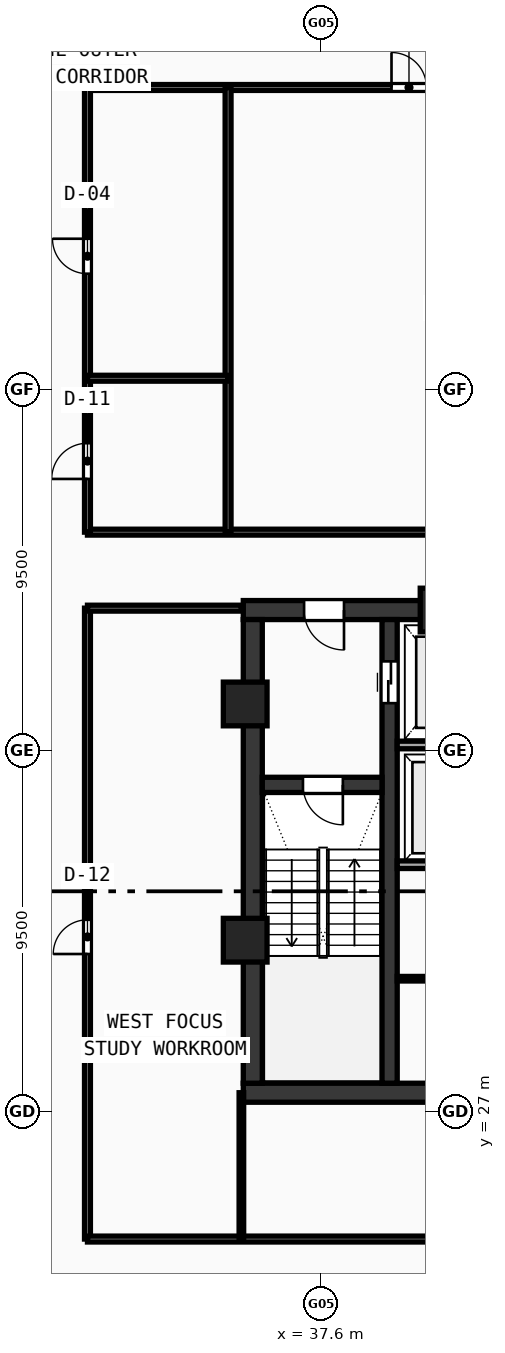
"""IFC4 building model, lengths in metres.
Left out: names, types, materials, properties, quantities, classifications, styles, units other than length and angle.
Written with IfcOpenShell. Run it as: python <this file> out.ifc"""

import sys

from ifc_helpers import new_model, si_unit, direction, frame, frame_2d, origin, origin_with_axes, origin_2d, place, context, subcontext, project, spatial, rectangle, hollow_rectangle, extrude, source, transform, mapped, element, fill, save


model = new_model("IFC4")
c1 = context("Model", 3, precision=1e-05, world=origin(), true_north=direction((0.0, 1.0)))
c2 = subcontext(c1, "Body", "Model", "MODEL_VIEW")
j1 = project(units=[si_unit("LENGTHUNIT", "METRE"), si_unit("PLANEANGLEUNIT", "RADIAN")], contexts=[c1])
p1 = place(None, origin())
s1 = spatial("IfcSite", under=j1, at=p1, CompositionType="ELEMENT")
p2 = place(p1, origin())
s2 = spatial("IfcBuilding", under=s1, at=p2, CompositionType="ELEMENT")
p3 = place(p2, frame((0.0, 0.0, 188.56)))
s3 = spatial("IfcBuildingStorey", under=s2, at=p3, CompositionType="ELEMENT", Elevation=188.56)
p4 = place(p3, frame((35.55, 27.5, 0.0), z_axis=(0.0, 0.0, 1.0), x_axis=(1.0, 0.0, 0.0)))
e1 = element("IfcWall", 1, at=p4, inside=s3, PredefinedType="SHEAR", context=c2, shape_type="SweptSolid", body=[
    extrude(rectangle(XDim=24.9, YDim=0.5, at=frame_2d((12.45, 0.0))), origin(), (0.0, 0.0, 1.0), 3.54),
])
p5 = place(p3, frame((35.55, 40.2, 0.0), z_axis=(0.0, 0.0, 1.0), x_axis=(1.0, 0.0, 0.0)))
e2 = element("IfcWall", 2, at=p5, inside=s3, PredefinedType="SHEAR", context=c2, shape_type="SweptSolid", body=[
    extrude(rectangle(XDim=11.25, YDim=0.5, at=frame_2d((5.625, 0.0))), origin(), (0.0, 0.0, 1.0), 3.54),
])
p6 = place(p5, frame((1.6, 0.0, 0.0)))
e3 = element("IfcOpeningElement", 3, at=p6, cuts=e2, PredefinedType="OPENING", context=c2, shape_type="SweptSolid", body=[
    extrude(rectangle(XDim=1.05, YDim=2.1, at=frame_2d((0.525, 1.05))), frame((0.0, 0.26, 0.0), z_axis=(0.0, -1.0, 0.0), x_axis=(1.0, 0.0, 0.0)), (0.0, 0.0, 1.0), 0.52),
])
p7 = place(p3, frame((35.8, 27.75, 0.0), z_axis=(0.0, 0.0, 1.0), x_axis=(0.0, 1.0, 0.0)))
e4 = element("IfcWall", 4, at=p7, inside=s3, PredefinedType="SHEAR", context=c2, shape_type="SweptSolid", body=[
    extrude(rectangle(XDim=12.2, YDim=0.5, at=frame_2d((6.1, 0.0))), origin(), (0.0, 0.0, 1.0), 3.54),
])
p8 = place(p3, frame((39.4, 27.75, 0.0), z_axis=(0.0, 0.0, 1.0), x_axis=(0.0, 1.0, 0.0)))
e5 = element("IfcWall", 5, at=p8, inside=s3, PredefinedType="SHEAR", context=c2, shape_type="SweptSolid", body=[
    extrude(rectangle(XDim=12.2, YDim=0.4, at=frame_2d((6.1, 0.0))), origin(), (0.0, 0.0, 1.0), 3.54),
])
p9 = place(p8, frame((10.0, 0.0, 0.0)))
e6 = element("IfcOpeningElement", 6, at=p9, cuts=e5, PredefinedType="OPENING", context=c2, shape_type="SweptSolid", body=[
    extrude(rectangle(XDim=1.1, YDim=2.1, at=frame_2d((0.55, 1.05))), frame((0.0, 0.21, 0.0), z_axis=(0.0, -1.0, 0.0), x_axis=(1.0, 0.0, 0.0)), (0.0, 0.0, 1.0), 0.42),
])
p10 = place(p3, frame((36.05, 35.6, 0.0), z_axis=(0.0, 0.0, 1.0), x_axis=(1.0, 0.0, 0.0)))
e7 = element("IfcWall", 7, at=p10, inside=s3, PredefinedType="SHEAR", context=c2, shape_type="SweptSolid", body=[
    extrude(rectangle(XDim=3.15, YDim=0.4, at=frame_2d((1.575, 0.0))), origin(), (0.0, 0.0, 1.0), 3.54),
])
p11 = place(p10, frame((1.07, 0.0, 0.0)))
e8 = element("IfcOpeningElement", 8, at=p11, cuts=e7, PredefinedType="OPENING", context=c2, shape_type="SweptSolid", body=[
    extrude(rectangle(XDim=1.05, YDim=2.1, at=frame_2d((0.525, 1.05))), frame((0.0, 0.21, 0.0), z_axis=(0.0, -1.0, 0.0), x_axis=(1.0, 0.0, 0.0)), (0.0, 0.0, 1.0), 0.42),
])
m1 = source(origin(), c2, "Body", "SweptSolid", [
    extrude(hollow_rectangle(XDim=1.15, YDim=1.15, WallThickness=0.048, at=origin_2d()), origin(), (0.0, 0.0, 1.0), 3.8),
])
for number, where, z_axis, x_axis in (
    (9, (40.781, 40.2, -0.26), (0.0, 0.0, 1.0), (1.0, 0.0, 0.0)),
    (10, (35.6, 37.729, -0.26), (0.0, 0.0, 1.0), (1.0, 0.0, 0.0)),
    (11, (35.6, 31.513, -0.26), (0.0, 0.0, 1.0), (1.0, 0.0, 0.0)),
):
    element("IfcColumn", number, at=place(p3, frame(where, z_axis=z_axis, x_axis=x_axis)), inside=s3, PredefinedType="COLUMN", context=c2, shape_type="MappedRepresentation", body=[
        mapped(m1, transform((0.0, 0.0, 0.0), scale=1.0)),
    ])
for number, where, z_axis, x_axis in (
    (12, (39.6, 36.65, 0.0), (0.0, 0.0, 1.0), (1.0, 0.0, 0.0)),
    (13, (39.6, 33.5, 0.0), (0.0, 0.0, 1.0), (1.0, 0.0, 0.0)),
):
    element("IfcWall", number, at=place(p3, frame(where, z_axis=z_axis, x_axis=x_axis)), inside=s3, PredefinedType="SOLIDWALL", context=c2, shape_type="SweptSolid", body=[
        extrude(rectangle(XDim=2.72, YDim=0.2, at=frame_2d((1.36, 0.0))), origin(), (0.0, 0.0, 1.0), 3.54),
    ])
p12 = place(p3, frame((39.6, 30.5, 0.0), z_axis=(0.0, 0.0, 1.0), x_axis=(1.0, 0.0, 0.0)))
e14 = element("IfcWall", 14, at=p12, inside=s3, PredefinedType="PARTITIONING", context=c2, shape_type="SweptSolid", body=[
    extrude(rectangle(XDim=2.72, YDim=0.12, at=frame_2d((1.36, 0.0))), origin(), (0.0, 0.0, 1.0), 3.54),
])
p13 = place(p3, frame((31.45, 42.25, 0.0), z_axis=(0.0, 0.0, 1.0), x_axis=(1.0, 0.0, 0.0)))
e15 = element("IfcWall", 15, at=p13, inside=s3, PredefinedType="PARTITIONING", context=c2, shape_type="SweptSolid", body=[
    extrude(rectangle(XDim=33.1, YDim=0.155, at=frame_2d((16.55, 0.0))), origin(), (0.0, 0.0, 1.0), 2.89),
])
p14 = place(p3, frame((31.45, 53.95, 0.0), z_axis=(0.0, 0.0, 1.0), x_axis=(1.0, 0.0, 0.0)))
e16 = element("IfcWall", 16, at=p14, inside=s3, PredefinedType="PARTITIONING", context=c2, shape_type="SweptSolid", body=[
    extrude(rectangle(XDim=33.1, YDim=0.155, at=frame_2d((16.55, 0.0))), origin(), (0.0, 0.0, 1.0), 2.89),
])
p15 = place(p14, frame((8.0, 0.0, 0.0)))
e17 = element("IfcOpeningElement", 17, at=p15, cuts=e16, PredefinedType="OPENING", context=c2, shape_type="SweptSolid", body=[
    extrude(rectangle(XDim=0.92, YDim=2.1, at=frame_2d((0.46, 1.05))), frame((0.0, 0.087, 0.0), z_axis=(0.0, -1.0, 0.0), x_axis=(1.0, 0.0, 0.0)), (0.0, 0.0, 1.0), 0.175),
])
p16 = place(p14, frame((21.55, 0.0, 0.0)))
e18 = element("IfcOpeningElement", 18, at=p16, cuts=e16, PredefinedType="OPENING", context=c2, shape_type="SweptSolid", body=[
    extrude(rectangle(XDim=0.92, YDim=2.1, at=frame_2d((0.46, 1.05))), frame((0.0, 0.087, 0.0), z_axis=(0.0, -1.0, 0.0), x_axis=(1.0, 0.0, 0.0)), (0.0, 0.0, 1.0), 0.175),
])
p17 = place(p3, frame((31.45, 42.25, 0.0), z_axis=(0.0, 0.0, 1.0), x_axis=(0.0, 1.0, 0.0)))
e19 = element("IfcWall", 19, at=p17, inside=s3, PredefinedType="PARTITIONING", context=c2, shape_type="SweptSolid", body=[
    extrude(rectangle(XDim=11.7, YDim=0.155, at=frame_2d((5.85, 0.0))), origin(), (0.0, 0.0, 1.0), 2.89),
])
p18 = place(p17, frame((1.4, 0.0, 0.0)))
e20 = element("IfcOpeningElement", 20, at=p18, cuts=e19, PredefinedType="OPENING", context=c2, shape_type="SweptSolid", body=[
    extrude(rectangle(XDim=0.94, YDim=2.1, at=frame_2d((0.47, 1.05))), frame((0.0, 0.087, 0.0), z_axis=(0.0, -1.0, 0.0), x_axis=(1.0, 0.0, 0.0)), (0.0, 0.0, 1.0), 0.175),
])
p19 = place(p17, frame((6.8, 0.0, 0.0)))
e21 = element("IfcOpeningElement", 21, at=p19, cuts=e19, PredefinedType="OPENING", context=c2, shape_type="SweptSolid", body=[
    extrude(rectangle(XDim=0.92, YDim=2.1, at=frame_2d((0.46, 1.05))), frame((0.0, 0.087, 0.0), z_axis=(0.0, -1.0, 0.0), x_axis=(1.0, 0.0, 0.0)), (0.0, 0.0, 1.0), 0.175),
])
p20 = place(p3, frame((35.15, 42.25, 0.0), z_axis=(0.0, 0.0, 1.0), x_axis=(0.0, 1.0, 0.0)))
e22 = element("IfcWall", 22, at=p20, inside=s3, PredefinedType="PARTITIONING", context=c2, shape_type="SweptSolid", body=[
    extrude(rectangle(XDim=11.7, YDim=0.155, at=frame_2d((5.85, 0.0))), origin(), (0.0, 0.0, 1.0), 2.89),
])
p21 = place(p3, frame((31.45, 46.3, 0.0), z_axis=(0.0, 0.0, 1.0), x_axis=(1.0, 0.0, 0.0)))
e23 = element("IfcWall", 23, at=p21, inside=s3, PredefinedType="PARTITIONING", context=c2, shape_type="SweptSolid", body=[
    extrude(rectangle(XDim=3.7, YDim=0.155, at=frame_2d((1.85, 0.0))), origin(), (0.0, 0.0, 1.0), 2.89),
])
p22 = place(p3, frame((31.45, 23.65, 0.0), z_axis=(0.0, 0.0, 1.0), x_axis=(0.0, 1.0, 0.0)))
e24 = element("IfcWall", 24, at=p22, inside=s3, PredefinedType="PARTITIONING", context=c2, shape_type="SweptSolid", body=[
    extrude(rectangle(XDim=16.6, YDim=0.155, at=frame_2d((8.3, 0.0))), origin(), (0.0, 0.0, 1.0), 2.89),
])
p23 = place(p22, frame((7.5, 0.0, 0.0)))
e25 = element("IfcOpeningElement", 25, at=p23, cuts=e24, PredefinedType="OPENING", context=c2, shape_type="SweptSolid", body=[
    extrude(rectangle(XDim=0.9, YDim=2.08, at=frame_2d((0.45, 1.04))), frame((0.0, 0.087, 0.0), z_axis=(0.0, -1.0, 0.0), x_axis=(1.0, 0.0, 0.0)), (0.0, 0.0, 1.0), 0.175),
])
p24 = place(p3, frame((31.45, 23.65, 0.0), z_axis=(0.0, 0.0, 1.0), x_axis=(1.0, 0.0, 0.0)))
e26 = element("IfcWall", 26, at=p24, inside=s3, PredefinedType="PARTITIONING", context=c2, shape_type="SweptSolid", body=[
    extrude(rectangle(XDim=33.1, YDim=0.155, at=frame_2d((16.55, 0.0))), origin(), (0.0, 0.0, 1.0), 2.89),
])
p25 = place(p24, frame((16.0, 0.0, 0.0)))
e27 = element("IfcOpeningElement", 27, at=p25, cuts=e26, PredefinedType="OPENING", context=c2, shape_type="SweptSolid", body=[
    extrude(rectangle(XDim=0.92, YDim=2.1, at=frame_2d((0.46, 1.05))), frame((0.0, 0.087, 0.0), z_axis=(0.0, -1.0, 0.0), x_axis=(1.0, 0.0, 0.0)), (0.0, 0.0, 1.0), 0.175),
])
p26 = place(p3, frame((31.45, 40.25, 0.0), z_axis=(0.0, 0.0, 1.0), x_axis=(1.0, 0.0, 0.0)))
e28 = element("IfcWall", 28, at=p26, inside=s3, PredefinedType="PARTITIONING", context=c2, shape_type="SweptSolid", body=[
    extrude(rectangle(XDim=4.05, YDim=0.155, at=frame_2d((2.025, 0.0))), origin(), (0.0, 0.0, 1.0), 3.54),
])
p27 = place(p3, frame((35.5, 23.65, 0.0), z_axis=(0.0, 0.0, 1.0), x_axis=(0.0, 1.0, 0.0)))
e29 = element("IfcWall", 29, at=p27, inside=s3, PredefinedType="PARTITIONING", context=c2, shape_type="SweptSolid", body=[
    extrude(rectangle(XDim=3.85, YDim=0.12, at=frame_2d((1.925, 0.0))), origin(), (0.0, 0.0, 1.0), 3.14),
])
m2 = source(origin(), c2, "Body", "SweptSolid", [
    extrude(rectangle(XDim=1.05, YDim=2.1, at=frame_2d((0.525, 1.05))), frame((0.0, 0.025, 0.0), z_axis=(0.0, -1.0, 0.0), x_axis=(1.0, 0.0, 0.0)), (0.0, 0.0, 1.0), 0.05),
])
p28 = place(p11, frame((1.05, 0.0, 0.0), z_axis=(0.0, 0.0, 1.0), x_axis=(-1.0, 0.0, 0.0)))
e30 = element("IfcDoor", 30, at=p28, inside=s3, OperationType="SINGLE_SWING_LEFT", PredefinedType="DOOR", context=c2, shape_type="MappedRepresentation", body=[
    mapped(m2, transform((0.0, 0.0, 0.0), scale=1.0)),
])
fill(e8, e30)
p29 = place(p6, frame((1.05, 0.0, 0.0), z_axis=(0.0, 0.0, 1.0), x_axis=(-1.0, 0.0, 0.0)))
e31 = element("IfcDoor", 31, at=p29, inside=s3, OperationType="SINGLE_SWING_LEFT", PredefinedType="DOOR", context=c2, shape_type="MappedRepresentation", body=[
    mapped(m2, transform((0.0, 0.0, 0.0), scale=1.0)),
])
fill(e3, e31)
m3 = source(origin(), c2, "Body", "SweptSolid", [
    extrude(rectangle(XDim=1.1, YDim=2.1, at=frame_2d((0.55, 1.05))), frame((0.0, 0.025, 0.0), z_axis=(0.0, -1.0, 0.0), x_axis=(1.0, 0.0, 0.0)), (0.0, 0.0, 1.0), 0.05),
])
p30 = place(p9, frame((1.1, 0.0, 0.0), z_axis=(0.0, 0.0, 1.0), x_axis=(-1.0, 0.0, 0.0)))
e32 = element("IfcDoor", 32, at=p30, inside=s3, OperationType="DOUBLE_DOOR_SLIDING", PredefinedType="DOOR", context=c2, shape_type="MappedRepresentation", body=[
    mapped(m3, transform((0.0, 0.0, 0.0), scale=1.0)),
])
fill(e6, e32)
m4 = source(origin(), c2, "Body", "SweptSolid", [
    extrude(rectangle(XDim=0.94, YDim=2.1, at=frame_2d((0.47, 1.05))), frame((0.0, 0.025, 0.0), z_axis=(0.0, -1.0, 0.0), x_axis=(1.0, 0.0, 0.0)), (0.0, 0.0, 1.0), 0.05),
])
p31 = place(p18, origin_with_axes())
e33 = element("IfcDoor", 33, at=p31, inside=s3, OperationType="SINGLE_SWING_LEFT", PredefinedType="DOOR", context=c2, shape_type="MappedRepresentation", body=[
    mapped(m4, transform((0.0, 0.0, 0.0), scale=1.0)),
])
fill(e20, e33)
m5 = source(origin(), c2, "Body", "SweptSolid", [
    extrude(rectangle(XDim=0.92, YDim=2.1, at=frame_2d((0.46, 1.05))), frame((0.0, 0.025, 0.0), z_axis=(0.0, -1.0, 0.0), x_axis=(1.0, 0.0, 0.0)), (0.0, 0.0, 1.0), 0.05),
])
p32 = place(p19, origin_with_axes())
e34 = element("IfcDoor", 34, at=p32, inside=s3, OperationType="SINGLE_SWING_RIGHT", PredefinedType="DOOR", context=c2, shape_type="MappedRepresentation", body=[
    mapped(m5, transform((0.0, 0.0, 0.0), scale=1.0)),
])
fill(e21, e34)
p33 = place(p15, origin_with_axes())
e35 = element("IfcDoor", 35, at=p33, inside=s3, OperationType="SINGLE_SWING_LEFT", PredefinedType="DOOR", context=c2, shape_type="MappedRepresentation", body=[
    mapped(m5, transform((0.0, 0.0, 0.0), scale=1.0)),
])
fill(e17, e35)
m6 = source(origin(), c2, "Body", "SweptSolid", [
    extrude(rectangle(XDim=0.9, YDim=2.08, at=frame_2d((0.45, 1.04))), frame((0.0, 0.025, 0.0), z_axis=(0.0, -1.0, 0.0), x_axis=(1.0, 0.0, 0.0)), (0.0, 0.0, 1.0), 0.05),
])
p34 = place(p23, origin_with_axes())
e36 = element("IfcDoor", 36, at=p34, inside=s3, OperationType="SINGLE_SWING_LEFT", PredefinedType="DOOR", context=c2, shape_type="MappedRepresentation", body=[
    mapped(m6, transform((0.0, 0.0, 0.0), scale=1.0)),
])
fill(e25, e36)
save(model, sys.argv[1])
